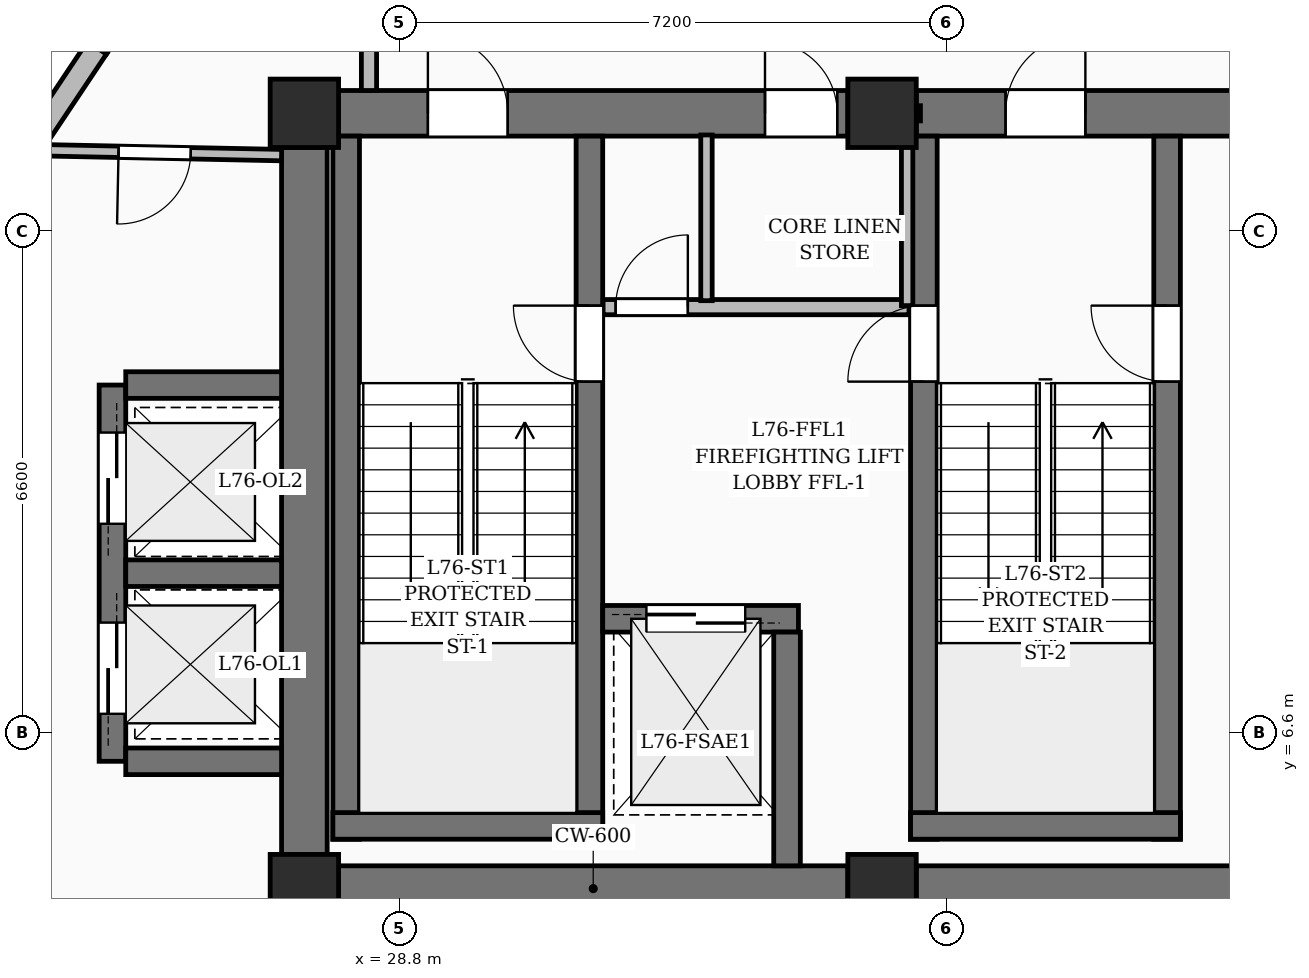
"""IFC4 building model, lengths in metres.
Left out: names, types, materials, properties, quantities, classifications, styles, units other than length and angle.
Written with IfcOpenShell. Run it as: python <this file> out.ifc"""

import sys

from ifc_helpers import new_model, si_unit, direction, frame, frame_2d, origin, origin_2d, place, context, subcontext, project, spatial, rectangle, extrude, element, fill, save


model = new_model("IFC4")
c1 = context("Model", 3, precision=1e-05, world=origin(), true_north=direction((0.0, 1.0)))
c2 = subcontext(c1, "Body", "Model", "MODEL_VIEW")
j1 = project(units=[si_unit("LENGTHUNIT", "METRE"), si_unit("PLANEANGLEUNIT", "RADIAN")], contexts=[c1])
p1 = place(None, origin())
s1 = spatial("IfcSite", under=j1, at=p1, CompositionType="ELEMENT")
p2 = place(p1, origin())
s2 = spatial("IfcBuilding", under=s1, at=p2, CompositionType="ELEMENT")
p3 = place(p2, frame((0.0, 0.0, 294.0)))
s3 = spatial("IfcBuildingStorey", under=s2, at=p3, CompositionType="ELEMENT", Elevation=294.0)
for number, where, z_axis, x_axis in (
    (1, (27.55, 4.55, 0.0), (0.0, 0.0, 1.0), (1.0, 0.0, 0.0)),
    (2, (35.15, 4.55, 0.0), (0.0, 0.0, 1.0), (1.0, 0.0, 0.0)),
    (3, (27.55, 14.75, 0.0), (0.0, 0.0, 1.0), (1.0, 0.0, 0.0)),
    (4, (35.15, 14.75, 0.0), (0.0, 0.0, 1.0), (1.0, 0.0, 0.0)),
):
    element("IfcColumn", number, at=place(p3, frame(where, z_axis=z_axis, x_axis=x_axis)), inside=s3, PredefinedType="COLUMN", context=c2, shape_type="SweptSolid", body=[
        extrude(rectangle(XDim=0.9, YDim=0.9, at=origin_2d()), origin(), (0.0, 0.0, 1.0), 4.5),
    ])
p4 = place(p3, frame((28.0, 4.55, 0.0), z_axis=(0.0, 0.0, 1.0), x_axis=(1.0, 0.0, 0.0)))
e5 = element("IfcWall", 5, at=p4, inside=s3, PredefinedType="SHEAR", context=c2, shape_type="SweptSolid", body=[
    extrude(rectangle(XDim=6.7, YDim=0.6, at=frame_2d((3.35, 0.0))), origin(), (0.0, 0.0, 1.0), 4.5),
])
p5 = place(p3, frame((35.6, 4.55, 0.0), z_axis=(0.0, 0.0, 1.0), x_axis=(1.0, 0.0, 0.0)))
e6 = element("IfcWall", 6, at=p5, inside=s3, PredefinedType="SHEAR", context=c2, shape_type="SweptSolid", body=[
    extrude(rectangle(XDim=11.0, YDim=0.6, at=frame_2d((5.5, 0.0))), origin(), (0.0, 0.0, 1.0), 4.5),
])
p6 = place(p3, frame((28.0, 14.75, 0.0), z_axis=(0.0, 0.0, 1.0), x_axis=(1.0, 0.0, 0.0)))
e7 = element("IfcWall", 7, at=p6, inside=s3, PredefinedType="SHEAR", context=c2, shape_type="SweptSolid", body=[
    extrude(rectangle(XDim=6.7, YDim=0.6, at=frame_2d((3.35, 0.0))), origin(), (0.0, 0.0, 1.0), 4.5),
])
p7 = place(p6, frame((1.175, 0.0, 0.0)))
e8 = element("IfcOpeningElement", 8, at=p7, cuts=e7, PredefinedType="OPENING", context=c2, shape_type="SweptSolid", body=[
    extrude(rectangle(XDim=1.05, YDim=2.15, at=frame_2d((0.525, 1.075))), frame((0.0, 0.31, 0.0), z_axis=(0.0, -1.0, 0.0), x_axis=(1.0, 0.0, 0.0)), (0.0, 0.0, 1.0), 0.62),
])
p8 = place(p6, frame((5.61, 0.0, 0.0)))
e9 = element("IfcOpeningElement", 9, at=p8, cuts=e7, PredefinedType="OPENING", context=c2, shape_type="SweptSolid", body=[
    extrude(rectangle(XDim=0.95, YDim=2.15, at=frame_2d((0.475, 1.075))), frame((0.0, 0.31, 0.0), z_axis=(0.0, -1.0, 0.0), x_axis=(1.0, 0.0, 0.0)), (0.0, 0.0, 1.0), 0.62),
])
p9 = place(p3, frame((35.6, 14.75, 0.0), z_axis=(0.0, 0.0, 1.0), x_axis=(1.0, 0.0, 0.0)))
e10 = element("IfcWall", 10, at=p9, inside=s3, PredefinedType="SHEAR", context=c2, shape_type="SweptSolid", body=[
    extrude(rectangle(XDim=11.0, YDim=0.6, at=frame_2d((5.5, 0.0))), origin(), (0.0, 0.0, 1.0), 4.5),
])
p10 = place(p9, frame((1.175, 0.0, 0.0)))
e11 = element("IfcOpeningElement", 11, at=p10, cuts=e10, PredefinedType="OPENING", context=c2, shape_type="SweptSolid", body=[
    extrude(rectangle(XDim=1.05, YDim=2.15, at=frame_2d((0.525, 1.075))), frame((0.0, 0.31, 0.0), z_axis=(0.0, -1.0, 0.0), x_axis=(1.0, 0.0, 0.0)), (0.0, 0.0, 1.0), 0.62),
])
p11 = place(p9, frame((8.775, 0.0, 0.0)))
e12 = element("IfcOpeningElement", 12, at=p11, cuts=e10, PredefinedType="OPENING", context=c2, shape_type="SweptSolid", body=[
    extrude(rectangle(XDim=1.05, YDim=2.15, at=frame_2d((0.525, 1.075))), frame((0.0, 0.31, 0.0), z_axis=(0.0, -1.0, 0.0), x_axis=(1.0, 0.0, 0.0)), (0.0, 0.0, 1.0), 0.62),
])
p12 = place(p9, frame((5.025, 0.0, 0.0)))
e13 = element("IfcOpeningElement", 13, at=p12, cuts=e10, PredefinedType="OPENING", context=c2, shape_type="SweptSolid", body=[
    extrude(rectangle(XDim=0.95, YDim=2.15, at=frame_2d((0.475, 1.075))), frame((0.0, 0.31, 0.0), z_axis=(0.0, -1.0, 0.0), x_axis=(1.0, 0.0, 0.0)), (0.0, 0.0, 1.0), 0.62),
])
p13 = place(p3, frame((27.55, 5.0, 0.0), z_axis=(0.0, 0.0, 1.0), x_axis=(0.0, 1.0, 0.0)))
e14 = element("IfcWall", 14, at=p13, inside=s3, PredefinedType="SHEAR", context=c2, shape_type="SweptSolid", body=[
    extrude(rectangle(XDim=9.3, YDim=0.6, at=frame_2d((4.65, 0.0))), origin(), (0.0, 0.0, 1.0), 4.5),
])
p14 = place(p3, frame((28.1, 5.2, 0.0), z_axis=(0.0, 0.0, 1.0), x_axis=(0.0, 1.0, 0.0)))
e15 = element("IfcWall", 15, at=p14, inside=s3, PredefinedType="SOLIDWALL", context=c2, shape_type="SweptSolid", body=[
    extrude(rectangle(XDim=9.25, YDim=0.35, at=frame_2d((4.625, 0.0))), origin(), (0.0, 0.0, 1.0), 4.5),
])
p15 = place(p3, frame((31.3, 5.2, 0.0), z_axis=(0.0, 0.0, 1.0), x_axis=(0.0, 1.0, 0.0)))
e16 = element("IfcWall", 16, at=p15, inside=s3, PredefinedType="SOLIDWALL", context=c2, shape_type="SweptSolid", body=[
    extrude(rectangle(XDim=9.25, YDim=0.35, at=frame_2d((4.625, 0.0))), origin(), (0.0, 0.0, 1.0), 4.5),
])
p16 = place(p15, frame((6.02, 0.0, 0.0)))
e17 = element("IfcOpeningElement", 17, at=p16, cuts=e16, PredefinedType="OPENING", context=c2, shape_type="SweptSolid", body=[
    extrude(rectangle(XDim=1.0, YDim=2.15, at=frame_2d((0.5, 1.075))), frame((0.0, 0.185, 0.0), z_axis=(0.0, -1.0, 0.0), x_axis=(1.0, 0.0, 0.0)), (0.0, 0.0, 1.0), 0.37),
])
p17 = place(p3, frame((27.925, 5.375, 0.0), z_axis=(0.0, 0.0, 1.0), x_axis=(1.0, 0.0, 0.0)))
e18 = element("IfcWall", 18, at=p17, inside=s3, PredefinedType="SOLIDWALL", context=c2, shape_type="SweptSolid", body=[
    extrude(rectangle(XDim=3.55, YDim=0.35, at=frame_2d((1.775, 0.0))), origin(), (0.0, 0.0, 1.0), 4.5),
])
p18 = place(p3, frame((35.7, 5.2, 0.0), z_axis=(0.0, 0.0, 1.0), x_axis=(0.0, 1.0, 0.0)))
e19 = element("IfcWall", 19, at=p18, inside=s3, PredefinedType="SOLIDWALL", context=c2, shape_type="SweptSolid", body=[
    extrude(rectangle(XDim=9.25, YDim=0.35, at=frame_2d((4.625, 0.0))), origin(), (0.0, 0.0, 1.0), 4.5),
])
p19 = place(p18, frame((6.02, 0.0, 0.0)))
e20 = element("IfcOpeningElement", 20, at=p19, cuts=e19, PredefinedType="OPENING", context=c2, shape_type="SweptSolid", body=[
    extrude(rectangle(XDim=1.0, YDim=2.15, at=frame_2d((0.5, 1.075))), frame((0.0, 0.185, 0.0), z_axis=(0.0, -1.0, 0.0), x_axis=(1.0, 0.0, 0.0)), (0.0, 0.0, 1.0), 0.37),
])
p20 = place(p3, frame((38.9, 5.2, 0.0), z_axis=(0.0, 0.0, 1.0), x_axis=(0.0, 1.0, 0.0)))
e21 = element("IfcWall", 21, at=p20, inside=s3, PredefinedType="SOLIDWALL", context=c2, shape_type="SweptSolid", body=[
    extrude(rectangle(XDim=9.25, YDim=0.35, at=frame_2d((4.625, 0.0))), origin(), (0.0, 0.0, 1.0), 4.5),
])
p21 = place(p20, frame((6.02, 0.0, 0.0)))
e22 = element("IfcOpeningElement", 22, at=p21, cuts=e21, PredefinedType="OPENING", context=c2, shape_type="SweptSolid", body=[
    extrude(rectangle(XDim=1.0, YDim=2.15, at=frame_2d((0.5, 1.075))), frame((0.0, 0.185, 0.0), z_axis=(0.0, -1.0, 0.0), x_axis=(1.0, 0.0, 0.0)), (0.0, 0.0, 1.0), 0.37),
])
p22 = place(p3, frame((35.525, 5.375, 0.0), z_axis=(0.0, 0.0, 1.0), x_axis=(1.0, 0.0, 0.0)))
e23 = element("IfcWall", 23, at=p22, inside=s3, PredefinedType="SOLIDWALL", context=c2, shape_type="SweptSolid", body=[
    extrude(rectangle(XDim=3.55, YDim=0.35, at=frame_2d((1.775, 0.0))), origin(), (0.0, 0.0, 1.0), 4.5),
])
p23 = place(p3, frame((31.475, 8.1, 0.0), z_axis=(0.0, 0.0, 1.0), x_axis=(1.0, 0.0, 0.0)))
e24 = element("IfcWall", 24, at=p23, inside=s3, PredefinedType="SOLIDWALL", context=c2, shape_type="SweptSolid", body=[
    extrude(rectangle(XDim=2.575, YDim=0.35, at=frame_2d((1.288, 0.0))), origin(), (0.0, 0.0, 1.0), 4.5),
])
p24 = place(p23, frame((0.575, 0.0, 0.0)))
e25 = element("IfcOpeningElement", 25, at=p24, cuts=e24, PredefinedType="OPENING", context=c2, shape_type="SweptSolid", body=[
    extrude(rectangle(XDim=1.3, YDim=2.25, at=frame_2d((0.65, 1.125))), frame((0.0, 0.185, 0.0), z_axis=(0.0, -1.0, 0.0), x_axis=(1.0, 0.0, 0.0)), (0.0, 0.0, 1.0), 0.37),
])
p25 = place(p3, frame((33.9, 4.85, 0.0), z_axis=(0.0, 0.0, 1.0), x_axis=(0.0, 1.0, 0.0)))
e26 = element("IfcWall", 26, at=p25, inside=s3, PredefinedType="SOLIDWALL", context=c2, shape_type="SweptSolid", body=[
    extrude(rectangle(XDim=3.075, YDim=0.35, at=frame_2d((1.538, 0.0))), origin(), (0.0, 0.0, 1.0), 4.5),
])
p26 = place(p3, frame((25.025, 6.225, 0.0), z_axis=(0.0, 0.0, 1.0), x_axis=(0.0, 1.0, 0.0)))
e27 = element("IfcWall", 27, at=p26, inside=s3, PredefinedType="SOLIDWALL", context=c2, shape_type="SweptSolid", body=[
    extrude(rectangle(XDim=4.95, YDim=0.35, at=frame_2d((2.475, 0.0))), origin(), (0.0, 0.0, 1.0), 4.5),
])
p27 = place(p26, frame((0.625, 0.0, 0.0)))
e28 = element("IfcOpeningElement", 28, at=p27, cuts=e27, PredefinedType="OPENING", context=c2, shape_type="SweptSolid", body=[
    extrude(rectangle(XDim=1.2, YDim=2.2, at=frame_2d((0.6, 1.1))), frame((0.0, 0.185, 0.0), z_axis=(0.0, -1.0, 0.0), x_axis=(1.0, 0.0, 0.0)), (0.0, 0.0, 1.0), 0.37),
])
p28 = place(p26, frame((3.125, 0.0, 0.0)))
e29 = element("IfcOpeningElement", 29, at=p28, cuts=e27, PredefinedType="OPENING", context=c2, shape_type="SweptSolid", body=[
    extrude(rectangle(XDim=1.2, YDim=2.2, at=frame_2d((0.6, 1.1))), frame((0.0, 0.185, 0.0), z_axis=(0.0, -1.0, 0.0), x_axis=(1.0, 0.0, 0.0)), (0.0, 0.0, 1.0), 0.37),
])
for number, where, z_axis, x_axis in (
    (30, (25.2, 6.225, 0.0), (0.0, 0.0, 1.0), (1.0, 0.0, 0.0)),
    (31, (25.2, 8.7, 0.0), (0.0, 0.0, 1.0), (1.0, 0.0, 0.0)),
    (32, (25.2, 11.175, 0.0), (0.0, 0.0, 1.0), (1.0, 0.0, 0.0)),
):
    element("IfcWall", number, at=place(p3, frame(where, z_axis=z_axis, x_axis=x_axis)), inside=s3, PredefinedType="SOLIDWALL", context=c2, shape_type="SweptSolid", body=[
        extrude(rectangle(XDim=2.05, YDim=0.35, at=frame_2d((1.025, 0.0))), origin(), (0.0, 0.0, 1.0), 4.5),
    ])
p29 = place(p3, frame((21.283, 10.312, 0.0), z_axis=(0.0, 0.0, 1.0), x_axis=(0.555265721759, 0.831672999586, 0.0)))
e33 = element("IfcWall", 33, at=p29, inside=s3, PredefinedType="SOLIDWALL", context=c2, shape_type="SweptSolid", body=[
    extrude(rectangle(XDim=6.375, YDim=0.3, at=frame_2d((3.187, 0.0))), origin(), (0.0, 0.0, 1.0), 4.2),
])
p30 = place(p29, frame((1.6, 0.0, 0.55)))
e34 = element("IfcOpeningElement", 34, at=p30, cuts=e33, PredefinedType="OPENING", context=c2, shape_type="SweptSolid", body=[
    extrude(rectangle(XDim=2.1, YDim=2.4, at=frame_2d((1.05, 1.2))), frame((0.0, 0.16, 0.0), z_axis=(0.0, -1.0, 0.0), x_axis=(1.0, 0.0, 0.0)), (0.0, 0.0, 1.0), 0.32),
])
p31 = place(p3, frame((24.822, 15.614, 0.0), z_axis=(0.0, 0.0, 1.0), x_axis=(0.555231896674, 0.831695581879, 0.0)))
e35 = element("IfcWall", 35, at=p31, inside=s3, PredefinedType="SOLIDWALL", context=c2, shape_type="SweptSolid", body=[
    extrude(rectangle(XDim=6.145, YDim=0.3, at=frame_2d((3.072, 0.0))), origin(), (0.0, 0.0, 1.0), 4.2),
])
p32 = place(p31, frame((2.25, 0.0, 0.6)))
e36 = element("IfcOpeningElement", 36, at=p32, cuts=e35, PredefinedType="OPENING", context=c2, shape_type="SweptSolid", body=[
    extrude(rectangle(XDim=1.8, YDim=2.1, at=frame_2d((0.9, 1.05))), frame((0.0, 0.16, 0.0), z_axis=(0.0, -1.0, 0.0), x_axis=(1.0, 0.0, 0.0)), (0.0, 0.0, 1.0), 0.32),
])
p33 = place(p3, frame((34.72, 14.75, 0.0), z_axis=(0.0, 0.0, 1.0), x_axis=(1.0, 0.0, 0.0)))
e37 = element("IfcWall", 37, at=p33, inside=s3, PredefinedType="PARTITIONING", context=c2, shape_type="SweptSolid", body=[
    extrude(rectangle(XDim=0.935, YDim=0.2, at=frame_2d((0.468, 0.0))), origin(), (0.0, 0.0, 1.0), 3.385),
])
p34 = place(p3, frame((31.48, 12.2, 0.0), z_axis=(0.0, 0.0, 1.0), x_axis=(1.0, 0.0, 0.0)))
e38 = element("IfcWall", 38, at=p34, inside=s3, PredefinedType="PARTITIONING", context=c2, shape_type="SweptSolid", body=[
    extrude(rectangle(XDim=4.025, YDim=0.2, at=frame_2d((2.012, 0.0))), origin(), (0.0, 0.0, 1.0), 4.2),
])
p35 = place(p34, frame((0.165, 0.0, 0.0)))
e39 = element("IfcOpeningElement", 39, at=p35, cuts=e38, PredefinedType="OPENING", context=c2, shape_type="SweptSolid", body=[
    extrude(rectangle(XDim=0.95, YDim=2.15, at=frame_2d((0.475, 1.075))), frame((0.0, 0.11, 0.0), z_axis=(0.0, -1.0, 0.0), x_axis=(1.0, 0.0, 0.0)), (0.0, 0.0, 1.0), 0.22),
])
p36 = place(p3, frame((32.84, 12.285, 0.0), z_axis=(0.0, 0.0, 1.0), x_axis=(0.0, 1.0, 0.0)))
e40 = element("IfcWall", 40, at=p36, inside=s3, PredefinedType="PARTITIONING", context=c2, shape_type="SweptSolid", body=[
    extrude(rectangle(XDim=2.18, YDim=0.15, at=frame_2d((1.09, 0.0))), origin(), (0.0, 0.0, 1.0), 3.385),
])
p37 = place(p3, frame((35.48, 12.22, 0.0), z_axis=(0.0, 0.0, 1.0), x_axis=(0.0, 1.0, 0.0)))
e41 = element("IfcWall", 41, at=p37, inside=s3, PredefinedType="PARTITIONING", context=c2, shape_type="SweptSolid", body=[
    extrude(rectangle(XDim=2.325, YDim=0.15, at=frame_2d((1.163, 0.0))), origin(), (0.0, 0.0, 1.0), 4.2),
])
p38 = place(p3, frame((28.4, 17.265, 0.0), z_axis=(0.0, 0.0, 1.0), x_axis=(0.0, -1.0, 0.0)))
e42 = element("IfcWall", 42, at=p38, inside=s3, PredefinedType="PARTITIONING", context=c2, shape_type="SweptSolid", body=[
    extrude(rectangle(XDim=2.215, YDim=0.2, at=frame_2d((1.107, 0.0))), origin(), (0.0, 0.0, 1.0), 3.535),
])
p39 = place(p3, frame((27.25, 14.2, 0.0), z_axis=(0.0, 0.0, 1.0), x_axis=(-0.999792455685, 0.020372666862, 0.0)))
e43 = element("IfcWall", 43, at=p39, inside=s3, PredefinedType="PARTITIONING", context=c2, shape_type="SweptSolid", body=[
    extrude(rectangle(XDim=3.188, YDim=0.15, at=frame_2d((1.594, 0.0))), origin(), (0.0, 0.0, 1.0), 3.477),
])
p40 = place(p39, frame((1.195, 0.0, 0.0)))
e44 = element("IfcOpeningElement", 44, at=p40, cuts=e43, PredefinedType="OPENING", context=c2, shape_type="SweptSolid", body=[
    extrude(rectangle(XDim=0.95, YDim=2.2, at=frame_2d((0.475, 1.1))), frame((0.0, 0.085, 0.0), z_axis=(0.0, -1.0, 0.0), x_axis=(1.0, 0.0, 0.0)), (0.0, 0.0, 1.0), 0.17),
])
p41 = place(p7, origin())
e45 = element("IfcDoor", 45, at=p41, inside=s3, OperationType="SINGLE_SWING_LEFT", PredefinedType="DOOR", context=c2, shape_type="SweptSolid", body=[
    extrude(rectangle(XDim=1.05, YDim=2.15, at=frame_2d((0.525, 1.075))), frame((0.0, 0.025, 0.0), z_axis=(0.0, -1.0, 0.0), x_axis=(1.0, 0.0, 0.0)), (0.0, 0.0, 1.0), 0.05),
])
fill(e8, e45)
p42 = place(p10, origin())
e46 = element("IfcDoor", 46, at=p42, inside=s3, OperationType="SINGLE_SWING_RIGHT", PredefinedType="DOOR", context=c2, shape_type="SweptSolid", body=[
    extrude(rectangle(XDim=1.05, YDim=2.15, at=frame_2d((0.525, 1.075))), frame((0.0, 0.025, 0.0), z_axis=(0.0, -1.0, 0.0), x_axis=(1.0, 0.0, 0.0)), (0.0, 0.0, 1.0), 0.05),
])
fill(e11, e46)
p43 = place(p16, origin())
e47 = element("IfcDoor", 47, at=p43, inside=s3, OperationType="SINGLE_SWING_RIGHT", PredefinedType="DOOR", context=c2, shape_type="SweptSolid", body=[
    extrude(rectangle(XDim=1.0, YDim=2.15, at=frame_2d((0.5, 1.075))), frame((0.0, 0.025, 0.0), z_axis=(0.0, -1.0, 0.0), x_axis=(1.0, 0.0, 0.0)), (0.0, 0.0, 1.0), 0.05),
])
fill(e17, e47)
p44 = place(p19, origin())
e48 = element("IfcDoor", 48, at=p44, inside=s3, OperationType="SINGLE_SWING_LEFT", PredefinedType="DOOR", context=c2, shape_type="SweptSolid", body=[
    extrude(rectangle(XDim=1.0, YDim=2.15, at=frame_2d((0.5, 1.075))), frame((0.0, 0.025, 0.0), z_axis=(0.0, -1.0, 0.0), x_axis=(1.0, 0.0, 0.0)), (0.0, 0.0, 1.0), 0.05),
])
fill(e20, e48)
p45 = place(p21, origin())
e49 = element("IfcDoor", 49, at=p45, inside=s3, OperationType="SINGLE_SWING_RIGHT", PredefinedType="DOOR", context=c2, shape_type="SweptSolid", body=[
    extrude(rectangle(XDim=1.0, YDim=2.15, at=frame_2d((0.5, 1.075))), frame((0.0, 0.025, 0.0), z_axis=(0.0, -1.0, 0.0), x_axis=(1.0, 0.0, 0.0)), (0.0, 0.0, 1.0), 0.05),
])
fill(e22, e49)
p46 = place(p24, origin())
e50 = element("IfcDoor", 50, at=p46, inside=s3, OperationType="DOUBLE_DOOR_SLIDING", PredefinedType="DOOR", context=c2, shape_type="SweptSolid", body=[
    extrude(rectangle(XDim=1.3, YDim=2.25, at=frame_2d((0.65, 1.125))), frame((0.0, 0.025, 0.0), z_axis=(0.0, -1.0, 0.0), x_axis=(1.0, 0.0, 0.0)), (0.0, 0.0, 1.0), 0.05),
])
fill(e25, e50)
p47 = place(p27, origin())
e51 = element("IfcDoor", 51, at=p47, inside=s3, OperationType="DOUBLE_DOOR_SLIDING", PredefinedType="DOOR", context=c2, shape_type="SweptSolid", body=[
    extrude(rectangle(XDim=1.2, YDim=2.2, at=frame_2d((0.6, 1.1))), frame((0.0, 0.025, 0.0), z_axis=(0.0, -1.0, 0.0), x_axis=(1.0, 0.0, 0.0)), (0.0, 0.0, 1.0), 0.05),
])
fill(e28, e51)
p48 = place(p28, origin())
e52 = element("IfcDoor", 52, at=p48, inside=s3, OperationType="DOUBLE_DOOR_SLIDING", PredefinedType="DOOR", context=c2, shape_type="SweptSolid", body=[
    extrude(rectangle(XDim=1.2, YDim=2.2, at=frame_2d((0.6, 1.1))), frame((0.0, 0.025, 0.0), z_axis=(0.0, -1.0, 0.0), x_axis=(1.0, 0.0, 0.0)), (0.0, 0.0, 1.0), 0.05),
])
fill(e29, e52)
p49 = place(p35, origin())
e53 = element("IfcDoor", 53, at=p49, inside=s3, OperationType="SINGLE_SWING_RIGHT", PredefinedType="DOOR", context=c2, shape_type="SweptSolid", body=[
    extrude(rectangle(XDim=0.95, YDim=2.15, at=frame_2d((0.475, 1.075))), frame((0.0, 0.025, 0.0), z_axis=(0.0, -1.0, 0.0), x_axis=(1.0, 0.0, 0.0)), (0.0, 0.0, 1.0), 0.05),
])
fill(e39, e53)
p50 = place(p8, origin())
e54 = element("IfcDoor", 54, at=p50, inside=s3, OperationType="SINGLE_SWING_LEFT", PredefinedType="DOOR", context=c2, shape_type="SweptSolid", body=[
    extrude(rectangle(XDim=0.95, YDim=2.15, at=frame_2d((0.475, 1.075))), frame((0.0, 0.025, 0.0), z_axis=(0.0, -1.0, 0.0), x_axis=(1.0, 0.0, 0.0)), (0.0, 0.0, 1.0), 0.05),
])
fill(e9, e54)
p51 = place(p40, origin())
e55 = element("IfcDoor", 55, at=p51, inside=s3, OperationType="SINGLE_SWING_RIGHT", PredefinedType="DOOR", context=c2, shape_type="SweptSolid", body=[
    extrude(rectangle(XDim=0.95, YDim=2.2, at=frame_2d((0.475, 1.1))), frame((0.0, 0.025, 0.0), z_axis=(0.0, -1.0, 0.0), x_axis=(1.0, 0.0, 0.0)), (0.0, 0.0, 1.0), 0.05),
])
fill(e44, e55)
save(model, sys.argv[1])
